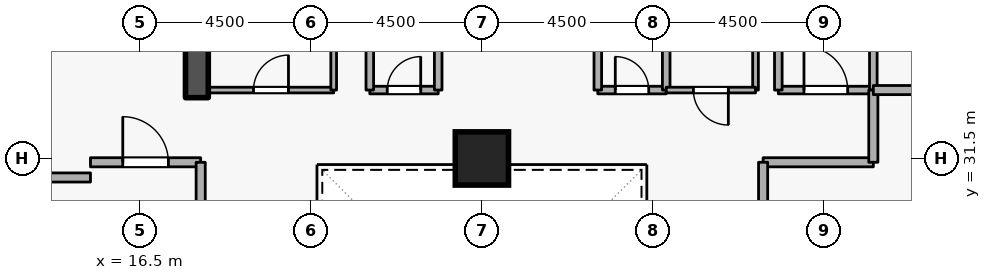
"""IFC4 building model, lengths in metres.
Left out: names, types, materials, properties, quantities, classifications, styles, units other than length and angle.
Written with IfcOpenShell. Run it as: python <this file> out.ifc"""

import sys

from ifc_helpers import new_model, si_unit, direction, frame, frame_2d, origin, origin_2d, place, context, subcontext, project, spatial, rectangle, extrude, element, fill, save


model = new_model("IFC4")
c1 = context("Model", 3, precision=1e-05, world=origin(), true_north=direction((0.0, 1.0)))
c2 = subcontext(c1, "Body", "Model", "MODEL_VIEW")
j1 = project(units=[si_unit("LENGTHUNIT", "METRE"), si_unit("PLANEANGLEUNIT", "RADIAN")], contexts=[c1])
p1 = place(None, origin())
s1 = spatial("IfcSite", under=j1, at=p1, CompositionType="ELEMENT")
p2 = place(p1, origin())
s2 = spatial("IfcBuilding", under=s1, at=p2, CompositionType="ELEMENT")
p3 = place(p2, frame((0.0, 0.0, 71.7)))
s3 = spatial("IfcBuildingStorey", under=s2, at=p3, CompositionType="ELEMENT", Elevation=71.7)
p4 = place(p3, frame((18.0, 33.1, 0.0), z_axis=(0.0, 0.0, 1.0), x_axis=(0.0, 1.0, 0.0)))
e1 = element("IfcWall", 1, at=p4, inside=s3, PredefinedType="SHEAR", context=c2, shape_type="SweptSolid", body=[
    extrude(rectangle(XDim=5.7, YDim=0.6, at=frame_2d((2.85, 0.0))), origin(), (0.0, 0.0, 1.0), 4.2),
])
p5 = place(p3, frame((25.5, 31.5, 0.0), z_axis=(0.0, 0.0, 1.0), x_axis=(1.0, 0.0, 0.0)))
e2 = element("IfcColumn", 2, at=p5, inside=s3, PredefinedType="COLUMN", context=c2, shape_type="SweptSolid", body=[
    extrude(rectangle(XDim=1.4, YDim=1.4, at=origin_2d()), origin(), (0.0, 0.0, 1.0), 4.2),
])
p6 = place(p3, frame((33.3, 33.3, 0.0), z_axis=(0.0, 0.0, 1.0), x_axis=(1.0, 0.0, 0.0)))
e3 = element("IfcWall", 3, at=p6, inside=s3, PredefinedType="STANDARD", context=c2, shape_type="SweptSolid", body=[
    extrude(rectangle(XDim=2.5, YDim=0.2, at=frame_2d((1.25, 0.0))), origin(), (0.0, 0.0, 1.0), 3.86),
])
p7 = place(p6, frame((0.675, 0.0, 0.0)))
e4 = element("IfcOpeningElement", 4, at=p7, cuts=e3, PredefinedType="OPENING", context=c2, shape_type="SweptSolid", body=[
    extrude(rectangle(XDim=1.15, YDim=2.1, at=frame_2d((0.575, 1.05))), frame((0.0, 0.11, 0.0), z_axis=(0.0, -1.0, 0.0), x_axis=(1.0, 0.0, 0.0)), (0.0, 0.0, 1.0), 0.22),
])
p8 = place(p3, frame((35.8, 33.3, 0.0), z_axis=(0.0, 0.0, 1.0), x_axis=(0.0, 1.0, 0.0)))
e5 = element("IfcWall", 5, at=p8, inside=s3, PredefinedType="STANDARD", context=c2, shape_type="SweptSolid", body=[
    extrude(rectangle(XDim=5.7, YDim=0.2, at=frame_2d((2.85, 0.0))), origin(), (0.0, 0.0, 1.0), 3.86),
])
p9 = place(p8, frame((2.275, 0.0, 0.0)))
e6 = element("IfcOpeningElement", 6, at=p9, cuts=e5, PredefinedType="OPENING", context=c2, shape_type="SweptSolid", body=[
    extrude(rectangle(XDim=1.15, YDim=2.1, at=frame_2d((0.575, 1.05))), frame((0.0, 0.11, 0.0), z_axis=(0.0, -1.0, 0.0), x_axis=(1.0, 0.0, 0.0)), (0.0, 0.0, 1.0), 0.22),
])
p10 = place(p3, frame((33.3, 35.6, 0.0), z_axis=(0.0, 0.0, 1.0), x_axis=(0.0, -1.0, 0.0)))
e7 = element("IfcWall", 7, at=p10, inside=s3, PredefinedType="STANDARD", context=c2, shape_type="SweptSolid", body=[
    extrude(rectangle(XDim=2.3, YDim=0.2, at=frame_2d((1.15, 0.0))), origin(), (0.0, 0.0, 1.0), 3.065),
])
p11 = place(p3, frame((22.55, 33.3, 0.0), z_axis=(0.0, 0.0, 1.0), x_axis=(1.0, 0.0, 0.0)))
e8 = element("IfcWall", 8, at=p11, inside=s3, PredefinedType="STANDARD", context=c2, shape_type="SweptSolid", body=[
    extrude(rectangle(XDim=1.8, YDim=0.2, at=frame_2d((0.9, 0.0))), origin(), (0.0, 0.0, 1.0), 3.86),
])
p12 = place(p11, frame((0.46, 0.0, 0.0)))
e9 = element("IfcOpeningElement", 9, at=p12, cuts=e8, PredefinedType="OPENING", context=c2, shape_type="SweptSolid", body=[
    extrude(rectangle(XDim=0.88, YDim=2.04, at=frame_2d((0.44, 1.02))), frame((0.0, 0.11, 0.0), z_axis=(0.0, -1.0, 0.0), x_axis=(1.0, 0.0, 0.0)), (0.0, 0.0, 1.0), 0.22),
])
for number, where, z_axis, x_axis in (
    (10, (24.35, 33.3, 0.0), (0.0, 0.0, 1.0), (0.0, 1.0, 0.0)),
    (11, (22.55, 35.35, 0.0), (0.0, 0.0, 1.0), (0.0, -1.0, 0.0)),
):
    element("IfcWall", number, at=place(p3, frame(where, z_axis=z_axis, x_axis=x_axis)), inside=s3, PredefinedType="STANDARD", context=c2, shape_type="SweptSolid", body=[
        extrude(rectangle(XDim=2.05, YDim=0.2, at=frame_2d((1.025, 0.0))), origin(), (0.0, 0.0, 1.0), 3.86),
    ])
p13 = place(p3, frame((28.55, 33.3, 0.0), z_axis=(0.0, 0.0, 1.0), x_axis=(1.0, 0.0, 0.0)))
e12 = element("IfcWall", 12, at=p13, inside=s3, PredefinedType="STANDARD", context=c2, shape_type="SweptSolid", body=[
    extrude(rectangle(XDim=1.8, YDim=0.2, at=frame_2d((0.9, 0.0))), origin(), (0.0, 0.0, 1.0), 3.86),
])
p14 = place(p13, frame((0.46, 0.0, 0.0)))
e13 = element("IfcOpeningElement", 13, at=p14, cuts=e12, PredefinedType="OPENING", context=c2, shape_type="SweptSolid", body=[
    extrude(rectangle(XDim=0.88, YDim=2.04, at=frame_2d((0.44, 1.02))), frame((0.0, 0.11, 0.0), z_axis=(0.0, -1.0, 0.0), x_axis=(1.0, 0.0, 0.0)), (0.0, 0.0, 1.0), 0.22),
])
for number, where, z_axis, x_axis in (
    (14, (30.35, 33.3, 0.0), (0.0, 0.0, 1.0), (0.0, 1.0, 0.0)),
    (15, (28.55, 35.35, 0.0), (0.0, 0.0, 1.0), (0.0, -1.0, 0.0)),
):
    element("IfcWall", number, at=place(p3, frame(where, z_axis=z_axis, x_axis=x_axis)), inside=s3, PredefinedType="STANDARD", context=c2, shape_type="SweptSolid", body=[
        extrude(rectangle(XDim=2.05, YDim=0.2, at=frame_2d((1.025, 0.0))), origin(), (0.0, 0.0, 1.0), 3.86),
    ])
p15 = place(p3, frame((32.9, 31.4, 0.0), z_axis=(0.0, 0.0, 1.0), x_axis=(1.0, 0.0, 0.0)))
e16 = element("IfcWall", 16, at=p15, inside=s3, PredefinedType="STANDARD", context=c2, shape_type="SweptSolid", body=[
    extrude(rectangle(XDim=2.9, YDim=0.24, at=frame_2d((1.45, 0.0))), origin(), (0.0, 0.0, 1.0), 3.86),
])
p16 = place(p3, frame((35.8, 31.4, 0.0), z_axis=(0.0, 0.0, 1.0), x_axis=(0.0, 1.0, 0.0)))
e17 = element("IfcWall", 17, at=p16, inside=s3, PredefinedType="STANDARD", context=c2, shape_type="SweptSolid", body=[
    extrude(rectangle(XDim=1.9, YDim=0.24, at=frame_2d((0.95, 0.0))), origin(), (0.0, 0.0, 1.0), 3.86),
])
p17 = place(p3, frame((35.8, 33.3, 0.0), z_axis=(0.0, 0.0, 1.0), x_axis=(1.0, 0.0, 0.0)))
e18 = element("IfcWall", 18, at=p17, inside=s3, PredefinedType="STANDARD", context=c2, shape_type="SweptSolid", body=[
    extrude(rectangle(XDim=6.2, YDim=0.24, at=frame_2d((3.1, 0.0))), origin(), (0.0, 0.0, 1.0), 3.86),
])
p18 = place(p3, frame((32.9, 29.38, 0.0), z_axis=(0.0, 0.0, 1.0), x_axis=(0.0, 1.0, 0.0)))
e19 = element("IfcWall", 19, at=p18, inside=s3, PredefinedType="STANDARD", context=c2, shape_type="SweptSolid", body=[
    extrude(rectangle(XDim=2.02, YDim=0.24, at=frame_2d((1.01, 0.0))), origin(), (0.0, 0.0, 1.0), 3.065),
])
p19 = place(p3, frame((15.2, 31.4, 0.0), z_axis=(0.0, 0.0, 1.0), x_axis=(1.0, 0.0, 0.0)))
e20 = element("IfcWall", 20, at=p19, inside=s3, PredefinedType="STANDARD", context=c2, shape_type="SweptSolid", body=[
    extrude(rectangle(XDim=2.9, YDim=0.24, at=frame_2d((1.45, 0.0))), origin(), (0.0, 0.0, 1.0), 3.86),
])
p20 = place(p19, frame((0.85, 0.0, 0.0)))
e21 = element("IfcOpeningElement", 21, at=p20, cuts=e20, PredefinedType="OPENING", context=c2, shape_type="SweptSolid", body=[
    extrude(rectangle(XDim=1.2, YDim=2.1, at=frame_2d((0.6, 1.05))), frame((0.0, 0.13, 0.0), z_axis=(0.0, -1.0, 0.0), x_axis=(1.0, 0.0, 0.0)), (0.0, 0.0, 1.0), 0.26),
])
p21 = place(p3, frame((18.1, 31.4, 0.0), z_axis=(0.0, 0.0, 1.0), x_axis=(0.0, -1.0, 0.0)))
e22 = element("IfcWall", 22, at=p21, inside=s3, PredefinedType="STANDARD", context=c2, shape_type="SweptSolid", body=[
    extrude(rectangle(XDim=2.25, YDim=0.24, at=frame_2d((1.125, 0.0))), origin(), (0.0, 0.0, 1.0), 3.065),
])
p22 = place(p3, frame((10.95, 31.0, 0.0), z_axis=(0.0, 0.0, 1.0), x_axis=(1.0, 0.0, 0.0)))
e23 = element("IfcWall", 23, at=p22, inside=s3, PredefinedType="STANDARD", context=c2, shape_type="SweptSolid", body=[
    extrude(rectangle(XDim=4.25, YDim=0.24, at=frame_2d((2.125, 0.0))), origin(), (0.0, 0.0, 1.0), 3.86),
])
p23 = place(p3, frame((18.3, 33.3, 0.0), z_axis=(0.0, 0.0, 1.0), x_axis=(1.0, 0.0, 0.0)))
e24 = element("IfcWall", 24, at=p23, inside=s3, PredefinedType="PARTITIONING", context=c2, shape_type="SweptSolid", body=[
    extrude(rectangle(XDim=3.3, YDim=0.15, at=frame_2d((1.65, 0.0))), origin(), (0.0, 0.0, 1.0), 3.86),
])
p24 = place(p23, frame((1.19, 0.0, 0.0)))
e25 = element("IfcOpeningElement", 25, at=p24, cuts=e24, PredefinedType="OPENING", context=c2, shape_type="SweptSolid", body=[
    extrude(rectangle(XDim=0.92, YDim=2.08, at=frame_2d((0.46, 1.04))), frame((0.0, 0.085, 0.0), z_axis=(0.0, -1.0, 0.0), x_axis=(1.0, 0.0, 0.0)), (0.0, 0.0, 1.0), 0.17),
])
p25 = place(p3, frame((21.6, 33.3, 0.0), z_axis=(0.0, 0.0, 1.0), x_axis=(0.0, 1.0, 0.0)))
e26 = element("IfcWall", 26, at=p25, inside=s3, PredefinedType="PARTITIONING", context=c2, shape_type="SweptSolid", body=[
    extrude(rectangle(XDim=2.05, YDim=0.15, at=frame_2d((1.025, 0.0))), origin(), (0.0, 0.0, 1.0), 3.86),
])
p26 = place(p3, frame((32.7, 35.35, 0.0), z_axis=(0.0, 0.0, 1.0), x_axis=(0.0, -1.0, 0.0)))
e27 = element("IfcWall", 27, at=p26, inside=s3, PredefinedType="PARTITIONING", context=c2, shape_type="SweptSolid", body=[
    extrude(rectangle(XDim=2.05, YDim=0.15, at=frame_2d((1.025, 0.0))), origin(), (0.0, 0.0, 1.0), 3.065),
])
p27 = place(p3, frame((32.7, 33.3, 0.0), z_axis=(0.0, 0.0, 1.0), x_axis=(-1.0, 0.0, 0.0)))
e28 = element("IfcWall", 28, at=p27, inside=s3, PredefinedType="PARTITIONING", context=c2, shape_type="SweptSolid", body=[
    extrude(rectangle(XDim=2.35, YDim=0.15, at=frame_2d((1.175, 0.0))), origin(), (0.0, 0.0, 1.0), 3.86),
])
p28 = place(p27, frame((0.715, 0.0, 0.0)))
e29 = element("IfcOpeningElement", 29, at=p28, cuts=e28, PredefinedType="OPENING", context=c2, shape_type="SweptSolid", body=[
    extrude(rectangle(XDim=0.92, YDim=2.08, at=frame_2d((0.46, 1.04))), frame((0.0, 0.085, 0.0), z_axis=(0.0, -1.0, 0.0), x_axis=(1.0, 0.0, 0.0)), (0.0, 0.0, 1.0), 0.17),
])
p29 = place(p7, origin())
e30 = element("IfcDoor", 30, at=p29, inside=s3, OperationType="SINGLE_SWING_LEFT", PredefinedType="DOOR", context=c2, shape_type="SweptSolid", body=[
    extrude(rectangle(XDim=1.15, YDim=2.1, at=frame_2d((0.575, 1.05))), frame((0.0, 0.025, 0.0), z_axis=(0.0, -1.0, 0.0), x_axis=(1.0, 0.0, 0.0)), (0.0, 0.0, 1.0), 0.05),
])
fill(e4, e30)
p30 = place(p12, origin())
e31 = element("IfcDoor", 31, at=p30, inside=s3, OperationType="SINGLE_SWING_RIGHT", PredefinedType="DOOR", context=c2, shape_type="SweptSolid", body=[
    extrude(rectangle(XDim=0.88, YDim=2.04, at=frame_2d((0.44, 1.02))), frame((0.0, 0.025, 0.0), z_axis=(0.0, -1.0, 0.0), x_axis=(1.0, 0.0, 0.0)), (0.0, 0.0, 1.0), 0.05),
])
fill(e9, e31)
p31 = place(p14, origin())
e32 = element("IfcDoor", 32, at=p31, inside=s3, OperationType="SINGLE_SWING_LEFT", PredefinedType="DOOR", context=c2, shape_type="SweptSolid", body=[
    extrude(rectangle(XDim=0.88, YDim=2.04, at=frame_2d((0.44, 1.02))), frame((0.0, 0.025, 0.0), z_axis=(0.0, -1.0, 0.0), x_axis=(1.0, 0.0, 0.0)), (0.0, 0.0, 1.0), 0.05),
])
fill(e13, e32)
p32 = place(p24, origin())
e33 = element("IfcDoor", 33, at=p32, inside=s3, OperationType="SINGLE_SWING_RIGHT", PredefinedType="DOOR", context=c2, shape_type="SweptSolid", body=[
    extrude(rectangle(XDim=0.92, YDim=2.08, at=frame_2d((0.46, 1.04))), frame((0.0, 0.025, 0.0), z_axis=(0.0, -1.0, 0.0), x_axis=(1.0, 0.0, 0.0)), (0.0, 0.0, 1.0), 0.05),
])
fill(e25, e33)
p33 = place(p28, origin())
e34 = element("IfcDoor", 34, at=p33, inside=s3, OperationType="SINGLE_SWING_LEFT", PredefinedType="DOOR", context=c2, shape_type="SweptSolid", body=[
    extrude(rectangle(XDim=0.92, YDim=2.08, at=frame_2d((0.46, 1.04))), frame((0.0, 0.025, 0.0), z_axis=(0.0, -1.0, 0.0), x_axis=(1.0, 0.0, 0.0)), (0.0, 0.0, 1.0), 0.05),
])
fill(e29, e34)
p34 = place(p20, origin())
e35 = element("IfcDoor", 35, at=p34, inside=s3, OperationType="SINGLE_SWING_LEFT", PredefinedType="DOOR", context=c2, shape_type="SweptSolid", body=[
    extrude(rectangle(XDim=1.2, YDim=2.1, at=frame_2d((0.6, 1.05))), frame((0.0, 0.025, 0.0), z_axis=(0.0, -1.0, 0.0), x_axis=(1.0, 0.0, 0.0)), (0.0, 0.0, 1.0), 0.05),
])
fill(e21, e35)
save(model, sys.argv[1])
